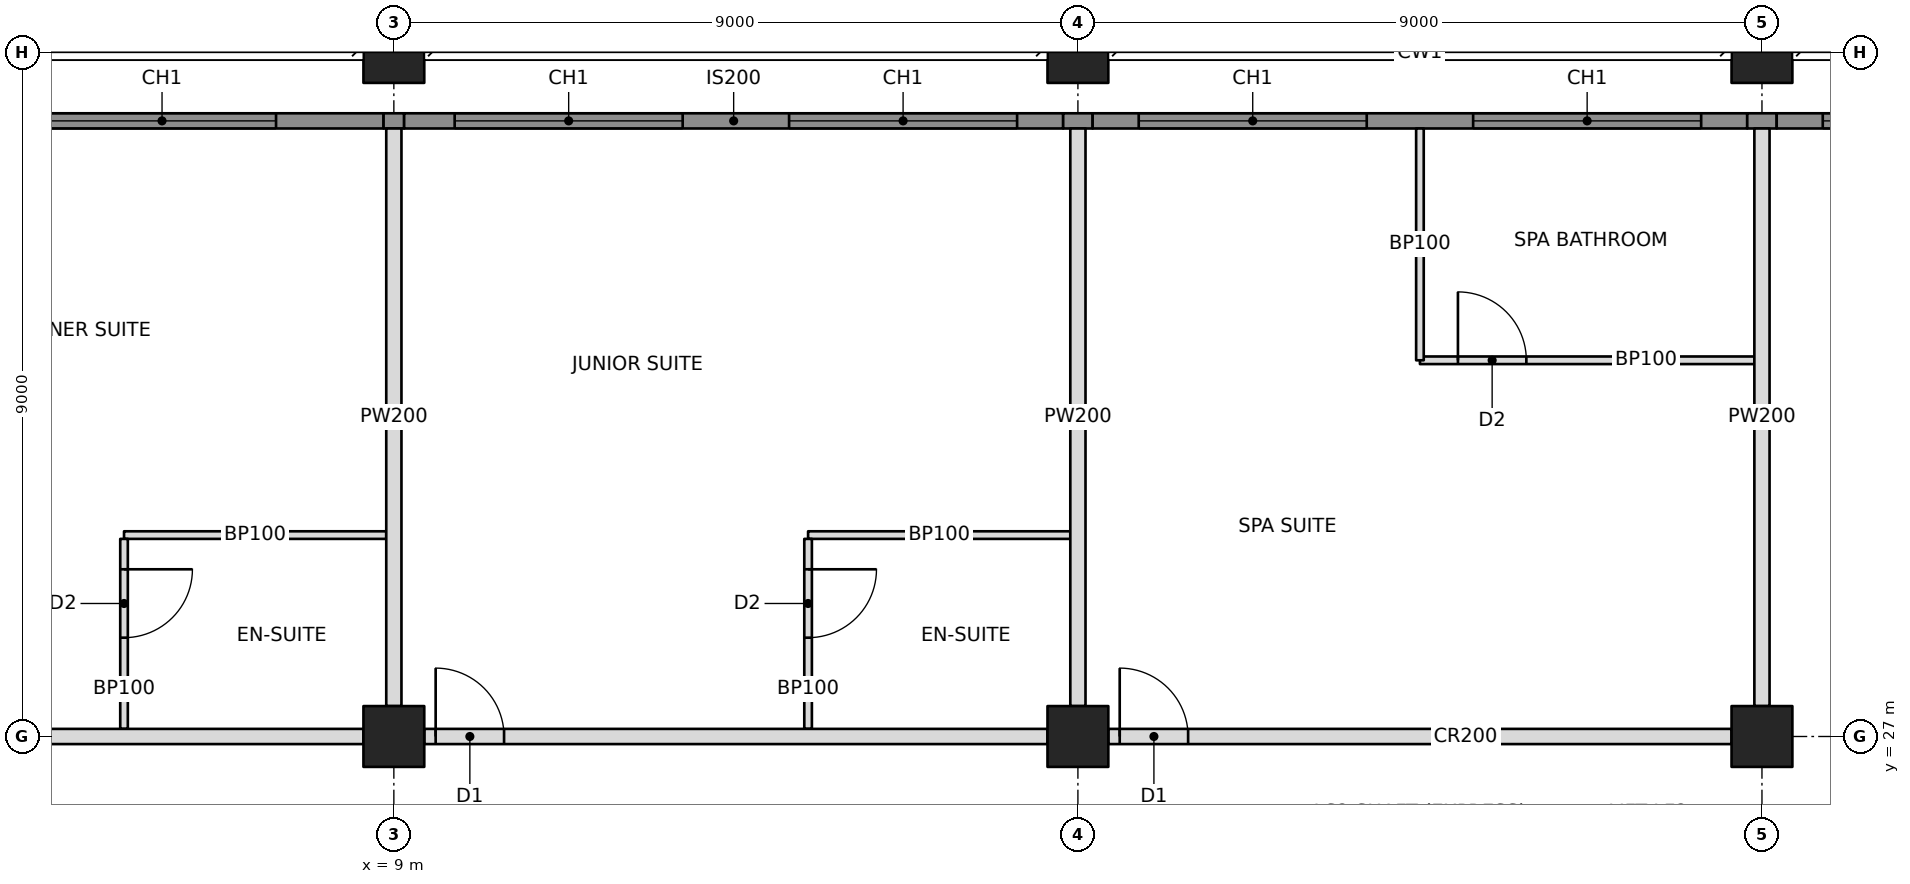
"""IFC4 building model, lengths in metres.
Left out: names, types, materials, properties, quantities, classifications, styles, units other than length and angle.
Written with IfcOpenShell. Run it as: python <this file> out.ifc"""

import sys

from ifc_helpers import new_model, si_unit, direction, frame, frame_2d, origin, origin_2d, place, context, subcontext, project, spatial, rectangle, hollow_rectangle, extrude, element, fill, save


model = new_model("IFC4")
c1 = context("Model", 3, precision=1e-05, world=origin(), true_north=direction((0.0, 1.0)))
c2 = subcontext(c1, "Body", "Model", "MODEL_VIEW")
j1 = project(units=[si_unit("LENGTHUNIT", "METRE"), si_unit("PLANEANGLEUNIT", "RADIAN")], contexts=[c1])
p1 = place(None, origin())
s1 = spatial("IfcSite", under=j1, at=p1, CompositionType="ELEMENT")
p2 = place(p1, origin())
s2 = spatial("IfcBuilding", under=s1, at=p2, CompositionType="ELEMENT")
p3 = place(p2, frame((0.0, 0.0, 124.8)))
s3 = spatial("IfcBuildingStorey", under=s2, at=p3, CompositionType="ELEMENT", Elevation=124.8)
p4 = place(p3, frame((9.0, 27.0, 0.0), z_axis=(0.0, 0.0, 1.0), x_axis=(1.0, 0.0, 0.0)))
e1 = element("IfcColumn", 1, at=p4, inside=s3, PredefinedType="COLUMN", context=c2, shape_type="SweptSolid", body=[
    extrude(hollow_rectangle(XDim=0.8, YDim=0.8, WallThickness=0.07, at=origin_2d()), origin(), (0.0, 0.0, 1.0), 3.4),
])
p5 = place(p3, frame((9.0, 36.0, 0.0), z_axis=(0.0, 0.0, 1.0), x_axis=(1.0, 0.0, 0.0)))
e2 = element("IfcColumn", 2, at=p5, inside=s3, PredefinedType="COLUMN", context=c2, shape_type="SweptSolid", body=[
    extrude(hollow_rectangle(XDim=0.8, YDim=0.8, WallThickness=0.06, at=origin_2d()), origin(), (0.0, 0.0, 1.0), 3.4),
])
p6 = place(p3, frame((18.0, 27.0, 0.0), z_axis=(0.0, 0.0, 1.0), x_axis=(1.0, 0.0, 0.0)))
e3 = element("IfcColumn", 3, at=p6, inside=s3, PredefinedType="COLUMN", context=c2, shape_type="SweptSolid", body=[
    extrude(hollow_rectangle(XDim=0.8, YDim=0.8, WallThickness=0.07, at=origin_2d()), origin(), (0.0, 0.0, 1.0), 3.4),
])
p7 = place(p3, frame((18.0, 36.0, 0.0), z_axis=(0.0, 0.0, 1.0), x_axis=(1.0, 0.0, 0.0)))
e4 = element("IfcColumn", 4, at=p7, inside=s3, PredefinedType="COLUMN", context=c2, shape_type="SweptSolid", body=[
    extrude(hollow_rectangle(XDim=0.8, YDim=0.8, WallThickness=0.06, at=origin_2d()), origin(), (0.0, 0.0, 1.0), 3.4),
])
p8 = place(p3, frame((27.0, 27.0, 0.0), z_axis=(0.0, 0.0, 1.0), x_axis=(1.0, 0.0, 0.0)))
e5 = element("IfcColumn", 5, at=p8, inside=s3, PredefinedType="COLUMN", context=c2, shape_type="SweptSolid", body=[
    extrude(hollow_rectangle(XDim=0.8, YDim=0.8, WallThickness=0.07, at=origin_2d()), origin(), (0.0, 0.0, 1.0), 3.4),
])
p9 = place(p3, frame((27.0, 36.0, 0.0), z_axis=(0.0, 0.0, 1.0), x_axis=(1.0, 0.0, 0.0)))
e6 = element("IfcColumn", 6, at=p9, inside=s3, PredefinedType="COLUMN", context=c2, shape_type="SweptSolid", body=[
    extrude(hollow_rectangle(XDim=0.8, YDim=0.8, WallThickness=0.06, at=origin_2d()), origin(), (0.0, 0.0, 1.0), 3.4),
])
p10 = place(p3, frame((3.0, 35.1, 0.0), z_axis=(0.0, 0.0, 1.0), x_axis=(1.0, 0.0, 0.0)))
e7 = element("IfcWall", 7, at=p10, inside=s3, PredefinedType="SOLIDWALL", context=c2, shape_type="SweptSolid", body=[
    extrude(rectangle(XDim=5.865, YDim=0.2, at=frame_2d((2.932, 0.0))), origin(), (0.0, 0.0, 1.0), 3.2),
])
p11 = place(p10, frame((1.45, 0.0, 0.6)))
e8 = element("IfcOpeningElement", 8, at=p11, cuts=e7, PredefinedType="OPENING", context=c2, shape_type="SweptSolid", body=[
    extrude(rectangle(XDim=3.0, YDim=2.2, at=frame_2d((1.5, 1.1))), frame((0.0, 0.11, 0.0), z_axis=(0.0, -1.0, 0.0), x_axis=(1.0, 0.0, 0.0)), (0.0, 0.0, 1.0), 0.22),
])
p12 = place(p3, frame((1.0, 27.0, 0.0), z_axis=(0.0, 0.0, 1.0), x_axis=(1.0, 0.0, 0.0)))
e9 = element("IfcWall", 9, at=p12, inside=s3, PredefinedType="PARTITIONING", context=c2, shape_type="SweptSolid", body=[
    extrude(rectangle(XDim=7.6, YDim=0.2, at=frame_2d((3.8, 0.0))), origin(), (0.0, 0.0, 1.0), 2.438),
])
p13 = place(p12, frame((0.25, 0.0, 0.0)))
e10 = element("IfcOpeningElement", 10, at=p13, cuts=e9, PredefinedType="OPENING", context=c2, shape_type="SweptSolid", body=[
    extrude(rectangle(XDim=0.9, YDim=2.1, at=frame_2d((0.45, 1.05))), frame((0.0, 0.11, 0.0), z_axis=(0.0, -1.0, 0.0), x_axis=(1.0, 0.0, 0.0)), (0.0, 0.0, 1.0), 0.22),
])
p14 = place(p3, frame((9.4, 27.0, 0.0), z_axis=(0.0, 0.0, 1.0), x_axis=(1.0, 0.0, 0.0)))
e11 = element("IfcWall", 11, at=p14, inside=s3, PredefinedType="PARTITIONING", context=c2, shape_type="SweptSolid", body=[
    extrude(rectangle(XDim=8.2, YDim=0.2, at=frame_2d((4.1, 0.0))), origin(), (0.0, 0.0, 1.0), 2.405),
])
p15 = place(p14, frame((0.15, 0.0, 0.0)))
e12 = element("IfcOpeningElement", 12, at=p15, cuts=e11, PredefinedType="OPENING", context=c2, shape_type="SweptSolid", body=[
    extrude(rectangle(XDim=0.9, YDim=2.1, at=frame_2d((0.45, 1.05))), frame((0.0, 0.11, 0.0), z_axis=(0.0, -1.0, 0.0), x_axis=(1.0, 0.0, 0.0)), (0.0, 0.0, 1.0), 0.22),
])
p16 = place(p3, frame((18.4, 27.0, 0.0), z_axis=(0.0, 0.0, 1.0), x_axis=(1.0, 0.0, 0.0)))
e13 = element("IfcWall", 13, at=p16, inside=s3, PredefinedType="PARTITIONING", context=c2, shape_type="SweptSolid", body=[
    extrude(rectangle(XDim=8.2, YDim=0.2, at=frame_2d((4.1, 0.0))), origin(), (0.0, 0.0, 1.0), 2.405),
])
p17 = place(p16, frame((0.15, 0.0, 0.0)))
e14 = element("IfcOpeningElement", 14, at=p17, cuts=e13, PredefinedType="OPENING", context=c2, shape_type="SweptSolid", body=[
    extrude(rectangle(XDim=0.9, YDim=2.1, at=frame_2d((0.45, 1.05))), frame((0.0, 0.11, 0.0), z_axis=(0.0, -1.0, 0.0), x_axis=(1.0, 0.0, 0.0)), (0.0, 0.0, 1.0), 0.22),
])
p18 = place(p3, frame((9.0, 27.4, 0.0), z_axis=(0.0, 0.0, 1.0), x_axis=(0.0, 1.0, 0.0)))
e15 = element("IfcWall", 15, at=p18, inside=s3, PredefinedType="PARTITIONING", context=c2, shape_type="SweptSolid", body=[
    extrude(rectangle(XDim=7.6, YDim=0.2, at=frame_2d((3.8, 0.0))), origin(), (0.0, 0.0, 1.0), 2.438),
])
for number, where, z_axis, x_axis in (
    (16, (18.0, 27.4, 0.0), (0.0, 0.0, 1.0), (0.0, 1.0, 0.0)),
    (17, (27.0, 27.4, 0.0), (0.0, 0.0, 1.0), (0.0, 1.0, 0.0)),
):
    element("IfcWall", number, at=place(p3, frame(where, z_axis=z_axis, x_axis=x_axis)), inside=s3, PredefinedType="PARTITIONING", context=c2, shape_type="SweptSolid", body=[
        extrude(rectangle(XDim=7.6, YDim=0.2, at=frame_2d((3.8, 0.0))), origin(), (0.0, 0.0, 1.0), 2.405),
    ])
p19 = place(p3, frame((5.45, 29.65, 0.0), z_axis=(0.0, 0.0, 1.0), x_axis=(1.0, 0.0, 0.0)))
e18 = element("IfcWall", 18, at=p19, inside=s3, PredefinedType="PARTITIONING", context=c2, shape_type="SweptSolid", body=[
    extrude(rectangle(XDim=3.45, YDim=0.1, at=frame_2d((1.725, 0.0))), origin(), (0.0, 0.0, 1.0), 2.438),
])
p20 = place(p3, frame((5.45, 27.1, 0.0), z_axis=(0.0, 0.0, 1.0), x_axis=(0.0, 1.0, 0.0)))
e19 = element("IfcWall", 19, at=p20, inside=s3, PredefinedType="PARTITIONING", context=c2, shape_type="SweptSolid", body=[
    extrude(rectangle(XDim=2.5, YDim=0.1, at=frame_2d((1.25, 0.0))), origin(), (0.0, 0.0, 1.0), 2.438),
])
p21 = place(p20, frame((1.2, 0.0, 0.0)))
e20 = element("IfcOpeningElement", 20, at=p21, cuts=e19, PredefinedType="OPENING", context=c2, shape_type="SweptSolid", body=[
    extrude(rectangle(XDim=0.9, YDim=2.1, at=frame_2d((0.45, 1.05))), frame((0.0, 0.06, 0.0), z_axis=(0.0, -1.0, 0.0), x_axis=(1.0, 0.0, 0.0)), (0.0, 0.0, 1.0), 0.12),
])
p22 = place(p3, frame((14.45, 29.65, 0.0), z_axis=(0.0, 0.0, 1.0), x_axis=(1.0, 0.0, 0.0)))
e21 = element("IfcWall", 21, at=p22, inside=s3, PredefinedType="PARTITIONING", context=c2, shape_type="SweptSolid", body=[
    extrude(rectangle(XDim=3.45, YDim=0.1, at=frame_2d((1.725, 0.0))), origin(), (0.0, 0.0, 1.0), 2.404),
])
p23 = place(p3, frame((14.45, 27.1, 0.0), z_axis=(0.0, 0.0, 1.0), x_axis=(0.0, 1.0, 0.0)))
e22 = element("IfcWall", 22, at=p23, inside=s3, PredefinedType="PARTITIONING", context=c2, shape_type="SweptSolid", body=[
    extrude(rectangle(XDim=2.5, YDim=0.1, at=frame_2d((1.25, 0.0))), origin(), (0.0, 0.0, 1.0), 2.404),
])
p24 = place(p23, frame((1.2, 0.0, 0.0)))
e23 = element("IfcOpeningElement", 23, at=p24, cuts=e22, PredefinedType="OPENING", context=c2, shape_type="SweptSolid", body=[
    extrude(rectangle(XDim=0.9, YDim=2.1, at=frame_2d((0.45, 1.05))), frame((0.0, 0.06, 0.0), z_axis=(0.0, -1.0, 0.0), x_axis=(1.0, 0.0, 0.0)), (0.0, 0.0, 1.0), 0.12),
])
p25 = place(p3, frame((22.5, 31.95, 0.0), z_axis=(0.0, 0.0, 1.0), x_axis=(1.0, 0.0, 0.0)))
e24 = element("IfcWall", 24, at=p25, inside=s3, PredefinedType="PARTITIONING", context=c2, shape_type="SweptSolid", body=[
    extrude(rectangle(XDim=4.4, YDim=0.1, at=frame_2d((2.2, 0.0))), origin(), (0.0, 0.0, 1.0), 2.404),
])
p26 = place(p25, frame((0.5, 0.0, 0.0)))
e25 = element("IfcOpeningElement", 25, at=p26, cuts=e24, PredefinedType="OPENING", context=c2, shape_type="SweptSolid", body=[
    extrude(rectangle(XDim=0.9, YDim=2.1, at=frame_2d((0.45, 1.05))), frame((0.0, 0.06, 0.0), z_axis=(0.0, -1.0, 0.0), x_axis=(1.0, 0.0, 0.0)), (0.0, 0.0, 1.0), 0.12),
])
p27 = place(p3, frame((22.5, 31.95, 0.0), z_axis=(0.0, 0.0, 1.0), x_axis=(0.0, 1.0, 0.0)))
e26 = element("IfcWall", 26, at=p27, inside=s3, PredefinedType="PARTITIONING", context=c2, shape_type="SweptSolid", body=[
    extrude(rectangle(XDim=3.05, YDim=0.1, at=frame_2d((1.525, 0.0))), origin(), (0.0, 0.0, 1.0), 3.2),
])
p28 = place(p3, frame((8.865, 35.1, 0.0), z_axis=(0.0, 0.0, 1.0), x_axis=(1.0, 0.0, 0.0)))
e27 = element("IfcWall", 27, at=p28, inside=s3, PredefinedType="SOLIDWALL", context=c2, shape_type="SweptSolid", body=[
    extrude(rectangle(XDim=0.271, YDim=0.2, at=frame_2d((0.135, 0.0))), origin(), (0.0, 0.0, 1.0), 2.438),
])
p29 = place(p3, frame((9.135, 35.1, 0.0), z_axis=(0.0, 0.0, 1.0), x_axis=(1.0, 0.0, 0.0)))
e28 = element("IfcWall", 28, at=p29, inside=s3, PredefinedType="SOLIDWALL", context=c2, shape_type="SweptSolid", body=[
    extrude(rectangle(XDim=8.671, YDim=0.2, at=frame_2d((4.335, 0.0))), origin(), (0.0, 0.0, 1.0), 3.2),
])
p30 = place(p29, frame((0.665, 0.0, 0.6)))
e29 = element("IfcOpeningElement", 29, at=p30, cuts=e28, PredefinedType="OPENING", context=c2, shape_type="SweptSolid", body=[
    extrude(rectangle(XDim=3.0, YDim=2.2, at=frame_2d((1.5, 1.1))), frame((0.0, 0.11, 0.0), z_axis=(0.0, -1.0, 0.0), x_axis=(1.0, 0.0, 0.0)), (0.0, 0.0, 1.0), 0.22),
])
p31 = place(p29, frame((5.065, 0.0, 0.6)))
e30 = element("IfcOpeningElement", 30, at=p31, cuts=e28, PredefinedType="OPENING", context=c2, shape_type="SweptSolid", body=[
    extrude(rectangle(XDim=3.0, YDim=2.2, at=frame_2d((1.5, 1.1))), frame((0.0, 0.11, 0.0), z_axis=(0.0, -1.0, 0.0), x_axis=(1.0, 0.0, 0.0)), (0.0, 0.0, 1.0), 0.22),
])
p32 = place(p3, frame((17.806, 35.1, 0.0), z_axis=(0.0, 0.0, 1.0), x_axis=(1.0, 0.0, 0.0)))
e31 = element("IfcWall", 31, at=p32, inside=s3, PredefinedType="SOLIDWALL", context=c2, shape_type="SweptSolid", body=[
    extrude(rectangle(XDim=0.388, YDim=0.2, at=frame_2d((0.194, 0.0))), origin(), (0.0, 0.0, 1.0), 2.404),
])
p33 = place(p3, frame((18.194, 35.1, 0.0), z_axis=(0.0, 0.0, 1.0), x_axis=(1.0, 0.0, 0.0)))
e32 = element("IfcWall", 32, at=p33, inside=s3, PredefinedType="SOLIDWALL", context=c2, shape_type="SweptSolid", body=[
    extrude(rectangle(XDim=8.612, YDim=0.2, at=frame_2d((4.306, 0.0))), origin(), (0.0, 0.0, 1.0), 3.2),
])
p34 = place(p33, frame((0.606, 0.0, 0.6)))
e33 = element("IfcOpeningElement", 33, at=p34, cuts=e32, PredefinedType="OPENING", context=c2, shape_type="SweptSolid", body=[
    extrude(rectangle(XDim=3.0, YDim=2.2, at=frame_2d((1.5, 1.1))), frame((0.0, 0.11, 0.0), z_axis=(0.0, -1.0, 0.0), x_axis=(1.0, 0.0, 0.0)), (0.0, 0.0, 1.0), 0.22),
])
p35 = place(p33, frame((5.006, 0.0, 0.6)))
e34 = element("IfcOpeningElement", 34, at=p35, cuts=e32, PredefinedType="OPENING", context=c2, shape_type="SweptSolid", body=[
    extrude(rectangle(XDim=3.0, YDim=2.2, at=frame_2d((1.5, 1.1))), frame((0.0, 0.11, 0.0), z_axis=(0.0, -1.0, 0.0), x_axis=(1.0, 0.0, 0.0)), (0.0, 0.0, 1.0), 0.22),
])
p36 = place(p3, frame((26.806, 35.1, 0.0), z_axis=(0.0, 0.0, 1.0), x_axis=(1.0, 0.0, 0.0)))
e35 = element("IfcWall", 35, at=p36, inside=s3, PredefinedType="SOLIDWALL", context=c2, shape_type="SweptSolid", body=[
    extrude(rectangle(XDim=0.388, YDim=0.2, at=frame_2d((0.194, 0.0))), origin(), (0.0, 0.0, 1.0), 2.404),
])
p37 = place(p3, frame((27.194, 35.1, 0.0), z_axis=(0.0, 0.0, 1.0), x_axis=(1.0, 0.0, 0.0)))
e36 = element("IfcWall", 36, at=p37, inside=s3, PredefinedType="SOLIDWALL", context=c2, shape_type="SweptSolid", body=[
    extrude(rectangle(XDim=8.671, YDim=0.2, at=frame_2d((4.335, 0.0))), origin(), (0.0, 0.0, 1.0), 3.2),
])
p38 = place(p37, frame((0.606, 0.0, 0.6)))
e37 = element("IfcOpeningElement", 37, at=p38, cuts=e36, PredefinedType="OPENING", context=c2, shape_type="SweptSolid", body=[
    extrude(rectangle(XDim=3.0, YDim=2.2, at=frame_2d((1.5, 1.1))), frame((0.0, 0.11, 0.0), z_axis=(0.0, -1.0, 0.0), x_axis=(1.0, 0.0, 0.0)), (0.0, 0.0, 1.0), 0.22),
])
p39 = place(p37, frame((5.006, 0.0, 0.6)))
e38 = element("IfcOpeningElement", 38, at=p39, cuts=e36, PredefinedType="OPENING", context=c2, shape_type="SweptSolid", body=[
    extrude(rectangle(XDim=3.0, YDim=2.2, at=frame_2d((1.5, 1.1))), frame((0.0, 0.11, 0.0), z_axis=(0.0, -1.0, 0.0), x_axis=(1.0, 0.0, 0.0)), (0.0, 0.0, 1.0), 0.22),
])
p40 = place(p11, origin())
e39 = element("IfcWindow", 39, at=p40, inside=s3, PartitioningType="TRIPLE_PANEL_VERTICAL", PredefinedType="WINDOW", context=c2, shape_type="SweptSolid", body=[
    extrude(rectangle(XDim=3.0, YDim=2.2, at=frame_2d((1.5, 1.1))), frame((0.0, 0.03, 0.0), z_axis=(0.0, -1.0, 0.0), x_axis=(1.0, 0.0, 0.0)), (0.0, 0.0, 1.0), 0.06),
])
fill(e8, e39)
p41 = place(p30, origin())
e40 = element("IfcWindow", 40, at=p41, inside=s3, PartitioningType="TRIPLE_PANEL_VERTICAL", PredefinedType="WINDOW", context=c2, shape_type="SweptSolid", body=[
    extrude(rectangle(XDim=3.0, YDim=2.2, at=frame_2d((1.5, 1.1))), frame((0.0, 0.03, 0.0), z_axis=(0.0, -1.0, 0.0), x_axis=(1.0, 0.0, 0.0)), (0.0, 0.0, 1.0), 0.06),
])
fill(e29, e40)
p42 = place(p31, origin())
e41 = element("IfcWindow", 41, at=p42, inside=s3, PartitioningType="TRIPLE_PANEL_VERTICAL", PredefinedType="WINDOW", context=c2, shape_type="SweptSolid", body=[
    extrude(rectangle(XDim=3.0, YDim=2.2, at=frame_2d((1.5, 1.1))), frame((0.0, 0.03, 0.0), z_axis=(0.0, -1.0, 0.0), x_axis=(1.0, 0.0, 0.0)), (0.0, 0.0, 1.0), 0.06),
])
fill(e30, e41)
p43 = place(p34, origin())
e42 = element("IfcWindow", 42, at=p43, inside=s3, PartitioningType="TRIPLE_PANEL_VERTICAL", PredefinedType="WINDOW", context=c2, shape_type="SweptSolid", body=[
    extrude(rectangle(XDim=3.0, YDim=2.2, at=frame_2d((1.5, 1.1))), frame((0.0, 0.03, 0.0), z_axis=(0.0, -1.0, 0.0), x_axis=(1.0, 0.0, 0.0)), (0.0, 0.0, 1.0), 0.06),
])
fill(e33, e42)
p44 = place(p35, origin())
e43 = element("IfcWindow", 43, at=p44, inside=s3, PartitioningType="TRIPLE_PANEL_VERTICAL", PredefinedType="WINDOW", context=c2, shape_type="SweptSolid", body=[
    extrude(rectangle(XDim=3.0, YDim=2.2, at=frame_2d((1.5, 1.1))), frame((0.0, 0.03, 0.0), z_axis=(0.0, -1.0, 0.0), x_axis=(1.0, 0.0, 0.0)), (0.0, 0.0, 1.0), 0.06),
])
fill(e34, e43)
p45 = place(p38, origin())
e44 = element("IfcWindow", 44, at=p45, inside=s3, PartitioningType="TRIPLE_PANEL_VERTICAL", PredefinedType="WINDOW", context=c2, shape_type="SweptSolid", body=[
    extrude(rectangle(XDim=3.0, YDim=2.2, at=frame_2d((1.5, 1.1))), frame((0.0, 0.03, 0.0), z_axis=(0.0, -1.0, 0.0), x_axis=(1.0, 0.0, 0.0)), (0.0, 0.0, 1.0), 0.06),
])
fill(e37, e44)
p46 = place(p21, frame((0.9, 0.0, 0.0), z_axis=(0.0, 0.0, 1.0), x_axis=(-1.0, 0.0, 0.0)))
e45 = element("IfcDoor", 45, at=p46, inside=s3, OperationType="SINGLE_SWING_LEFT", PredefinedType="DOOR", context=c2, shape_type="SweptSolid", body=[
    extrude(rectangle(XDim=0.9, YDim=2.1, at=frame_2d((0.45, 1.05))), frame((0.0, 0.025, 0.0), z_axis=(0.0, -1.0, 0.0), x_axis=(1.0, 0.0, 0.0)), (0.0, 0.0, 1.0), 0.05),
])
fill(e20, e45)
p47 = place(p24, frame((0.9, 0.0, 0.0), z_axis=(0.0, 0.0, 1.0), x_axis=(-1.0, 0.0, 0.0)))
e46 = element("IfcDoor", 46, at=p47, inside=s3, OperationType="SINGLE_SWING_LEFT", PredefinedType="DOOR", context=c2, shape_type="SweptSolid", body=[
    extrude(rectangle(XDim=0.9, YDim=2.1, at=frame_2d((0.45, 1.05))), frame((0.0, 0.025, 0.0), z_axis=(0.0, -1.0, 0.0), x_axis=(1.0, 0.0, 0.0)), (0.0, 0.0, 1.0), 0.05),
])
fill(e23, e46)
p48 = place(p15, origin())
e47 = element("IfcDoor", 47, at=p48, inside=s3, OperationType="SINGLE_SWING_LEFT", PredefinedType="DOOR", context=c2, shape_type="SweptSolid", body=[
    extrude(rectangle(XDim=0.9, YDim=2.1, at=frame_2d((0.45, 1.05))), frame((0.0, 0.025, 0.0), z_axis=(0.0, -1.0, 0.0), x_axis=(1.0, 0.0, 0.0)), (0.0, 0.0, 1.0), 0.05),
])
fill(e12, e47)
p49 = place(p26, origin())
e48 = element("IfcDoor", 48, at=p49, inside=s3, OperationType="SINGLE_SWING_LEFT", PredefinedType="DOOR", context=c2, shape_type="SweptSolid", body=[
    extrude(rectangle(XDim=0.9, YDim=2.1, at=frame_2d((0.45, 1.05))), frame((0.0, 0.025, 0.0), z_axis=(0.0, -1.0, 0.0), x_axis=(1.0, 0.0, 0.0)), (0.0, 0.0, 1.0), 0.05),
])
fill(e25, e48)
p50 = place(p17, origin())
e49 = element("IfcDoor", 49, at=p50, inside=s3, OperationType="SINGLE_SWING_LEFT", PredefinedType="DOOR", context=c2, shape_type="SweptSolid", body=[
    extrude(rectangle(XDim=0.9, YDim=2.1, at=frame_2d((0.45, 1.05))), frame((0.0, 0.025, 0.0), z_axis=(0.0, -1.0, 0.0), x_axis=(1.0, 0.0, 0.0)), (0.0, 0.0, 1.0), 0.05),
])
fill(e14, e49)
save(model, sys.argv[1])
